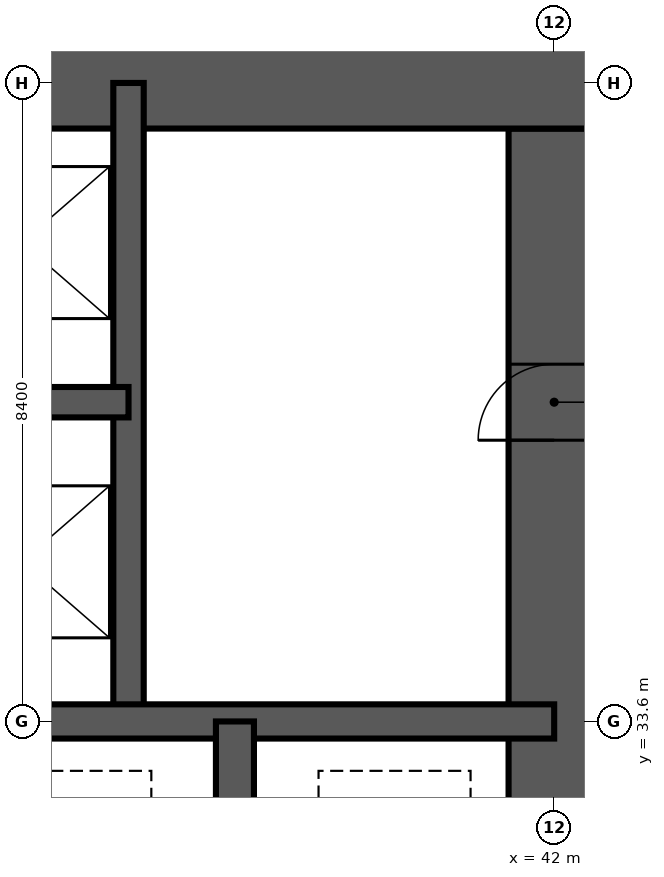
"""IFC4 building model, lengths in metres.
Left out: names, types, materials, properties, quantities, classifications, styles, units other than length and angle.
Written with IfcOpenShell. Run it as: python <this file> out.ifc"""

import sys

from ifc_helpers import new_model, si_unit, direction, frame, frame_2d, origin, place, context, subcontext, project, spatial, rectangle, extrude, element, fill, save


model = new_model("IFC4")
c1 = context("Model", 3, precision=1e-05, world=origin(), true_north=direction((0.0, 1.0)))
c2 = subcontext(c1, "Body", "Model", "MODEL_VIEW")
j1 = project(units=[si_unit("LENGTHUNIT", "METRE"), si_unit("PLANEANGLEUNIT", "RADIAN")], contexts=[c1])
p1 = place(None, origin())
s1 = spatial("IfcSite", under=j1, at=p1, CompositionType="ELEMENT")
p2 = place(p1, origin())
s2 = spatial("IfcBuilding", under=s1, at=p2, CompositionType="ELEMENT")
p3 = place(p2, frame((0.0, 0.0, 216.6)))
s3 = spatial("IfcBuildingStorey", under=s2, at=p3, CompositionType="ELEMENT", Elevation=216.6)
p4 = place(p3, frame((42.0, 17.4, -0.35), z_axis=(0.0, 0.0, 1.0), x_axis=(0.0, 1.0, 0.0)))
e1 = element("IfcWall", 1, at=p4, inside=s3, PredefinedType="SHEAR", context=c2, shape_type="SweptSolid", body=[
    extrude(rectangle(XDim=24.0, YDim=1.2, at=frame_2d((12.0, 0.0))), origin(), (0.0, 0.0, 1.0), 3.55),
])
p5 = place(p4, frame((0.2, 0.0, 0.35)))
e2 = element("IfcOpeningElement", 2, at=p5, cuts=e1, PredefinedType="OPENING", context=c2, shape_type="SweptSolid", body=[
    extrude(rectangle(XDim=1.2, YDim=2.2, at=frame_2d((0.6, 1.1))), frame((0.0, 0.61, 0.0), z_axis=(0.0, -1.0, 0.0), x_axis=(1.0, 0.0, 0.0)), (0.0, 0.0, 1.0), 1.22),
])
p6 = place(p4, frame((11.5, 0.0, 0.35)))
e3 = element("IfcOpeningElement", 3, at=p6, cuts=e1, PredefinedType="OPENING", context=c2, shape_type="SweptSolid", body=[
    extrude(rectangle(XDim=1.0, YDim=2.1, at=frame_2d((0.5, 1.05))), frame((0.0, 0.61, 0.0), z_axis=(0.0, -1.0, 0.0), x_axis=(1.0, 0.0, 0.0)), (0.0, 0.0, 1.0), 1.22),
])
p7 = place(p4, frame((19.9, 0.0, 0.35)))
e4 = element("IfcOpeningElement", 4, at=p7, cuts=e1, PredefinedType="OPENING", context=c2, shape_type="SweptSolid", body=[
    extrude(rectangle(XDim=1.0, YDim=2.1, at=frame_2d((0.5, 1.05))), frame((0.0, 0.61, 0.0), z_axis=(0.0, -1.0, 0.0), x_axis=(1.0, 0.0, 0.0)), (0.0, 0.0, 1.0), 1.22),
])
p8 = place(p3, frame((42.6, 42.0, -0.35), z_axis=(0.0, 0.0, 1.0), x_axis=(-1.0, 0.0, 0.0)))
e5 = element("IfcWall", 5, at=p8, inside=s3, PredefinedType="SHEAR", context=c2, shape_type="SweptSolid", body=[
    extrude(rectangle(XDim=26.4, YDim=1.2, at=frame_2d((13.2, 0.0))), origin(), (0.0, 0.0, 1.0), 3.55),
])
p9 = place(p8, frame((21.1, 0.0, 0.35)))
e6 = element("IfcOpeningElement", 6, at=p9, cuts=e5, PredefinedType="OPENING", context=c2, shape_type="SweptSolid", body=[
    extrude(rectangle(XDim=1.0, YDim=2.1, at=frame_2d((0.5, 1.05))), frame((0.0, 0.61, 0.0), z_axis=(0.0, -1.0, 0.0), x_axis=(1.0, 0.0, 0.0)), (0.0, 0.0, 1.0), 1.22),
])
p10 = place(p8, frame((10.5, 0.0, 0.35)))
e7 = element("IfcOpeningElement", 7, at=p10, cuts=e5, PredefinedType="OPENING", context=c2, shape_type="SweptSolid", body=[
    extrude(rectangle(XDim=1.2, YDim=2.2, at=frame_2d((0.6, 1.1))), frame((0.0, 0.61, 0.0), z_axis=(0.0, -1.0, 0.0), x_axis=(1.0, 0.0, 0.0)), (0.0, 0.0, 1.0), 1.22),
])
p11 = place(p3, frame((36.4, 33.6, -0.35), z_axis=(0.0, 0.0, 1.0), x_axis=(0.0, 1.0, 0.0)))
e8 = element("IfcWall", 8, at=p11, inside=s3, PredefinedType="SHEAR", context=c2, shape_type="SweptSolid", body=[
    extrude(rectangle(XDim=8.4, YDim=0.4, at=frame_2d((4.2, 0.0))), origin(), (0.0, 0.0, 1.0), 3.55),
])
p12 = place(p3, frame((33.6, 37.8, -0.35), z_axis=(0.0, 0.0, 1.0), x_axis=(1.0, 0.0, 0.0)))
e9 = element("IfcWall", 9, at=p12, inside=s3, PredefinedType="SHEAR", context=c2, shape_type="SweptSolid", body=[
    extrude(rectangle(XDim=2.8, YDim=0.4, at=frame_2d((1.4, 0.0))), origin(), (0.0, 0.0, 1.0), 3.55),
])
p13 = place(p3, frame((16.8, 33.6, -0.35), z_axis=(0.0, 0.0, 1.0), x_axis=(1.0, 0.0, 0.0)))
e10 = element("IfcWall", 10, at=p13, inside=s3, PredefinedType="SHEAR", context=c2, shape_type="SweptSolid", body=[
    extrude(rectangle(XDim=25.2, YDim=0.45, at=frame_2d((12.6, 0.0))), origin(), (0.0, 0.0, 1.0), 3.55),
])
p14 = place(p3, frame((37.8, 30.8, -0.35), z_axis=(0.0, 0.0, 1.0), x_axis=(0.0, 1.0, 0.0)))
e11 = element("IfcWall", 11, at=p14, inside=s3, PredefinedType="SHEAR", context=c2, shape_type="SweptSolid", body=[
    extrude(rectangle(XDim=2.8, YDim=0.5, at=frame_2d((1.4, 0.0))), origin(), (0.0, 0.0, 1.0), 3.55),
])
p15 = place(p7, origin())
e12 = element("IfcDoor", 12, at=p15, inside=s3, OperationType="SINGLE_SWING_LEFT", PredefinedType="DOOR", context=c2, shape_type="SweptSolid", body=[
    extrude(rectangle(XDim=1.0, YDim=2.1, at=frame_2d((0.5, 1.05))), frame((0.0, 0.025, 0.0), z_axis=(0.0, -1.0, 0.0), x_axis=(1.0, 0.0, 0.0)), (0.0, 0.0, 1.0), 0.05),
])
fill(e4, e12)
save(model, sys.argv[1])
